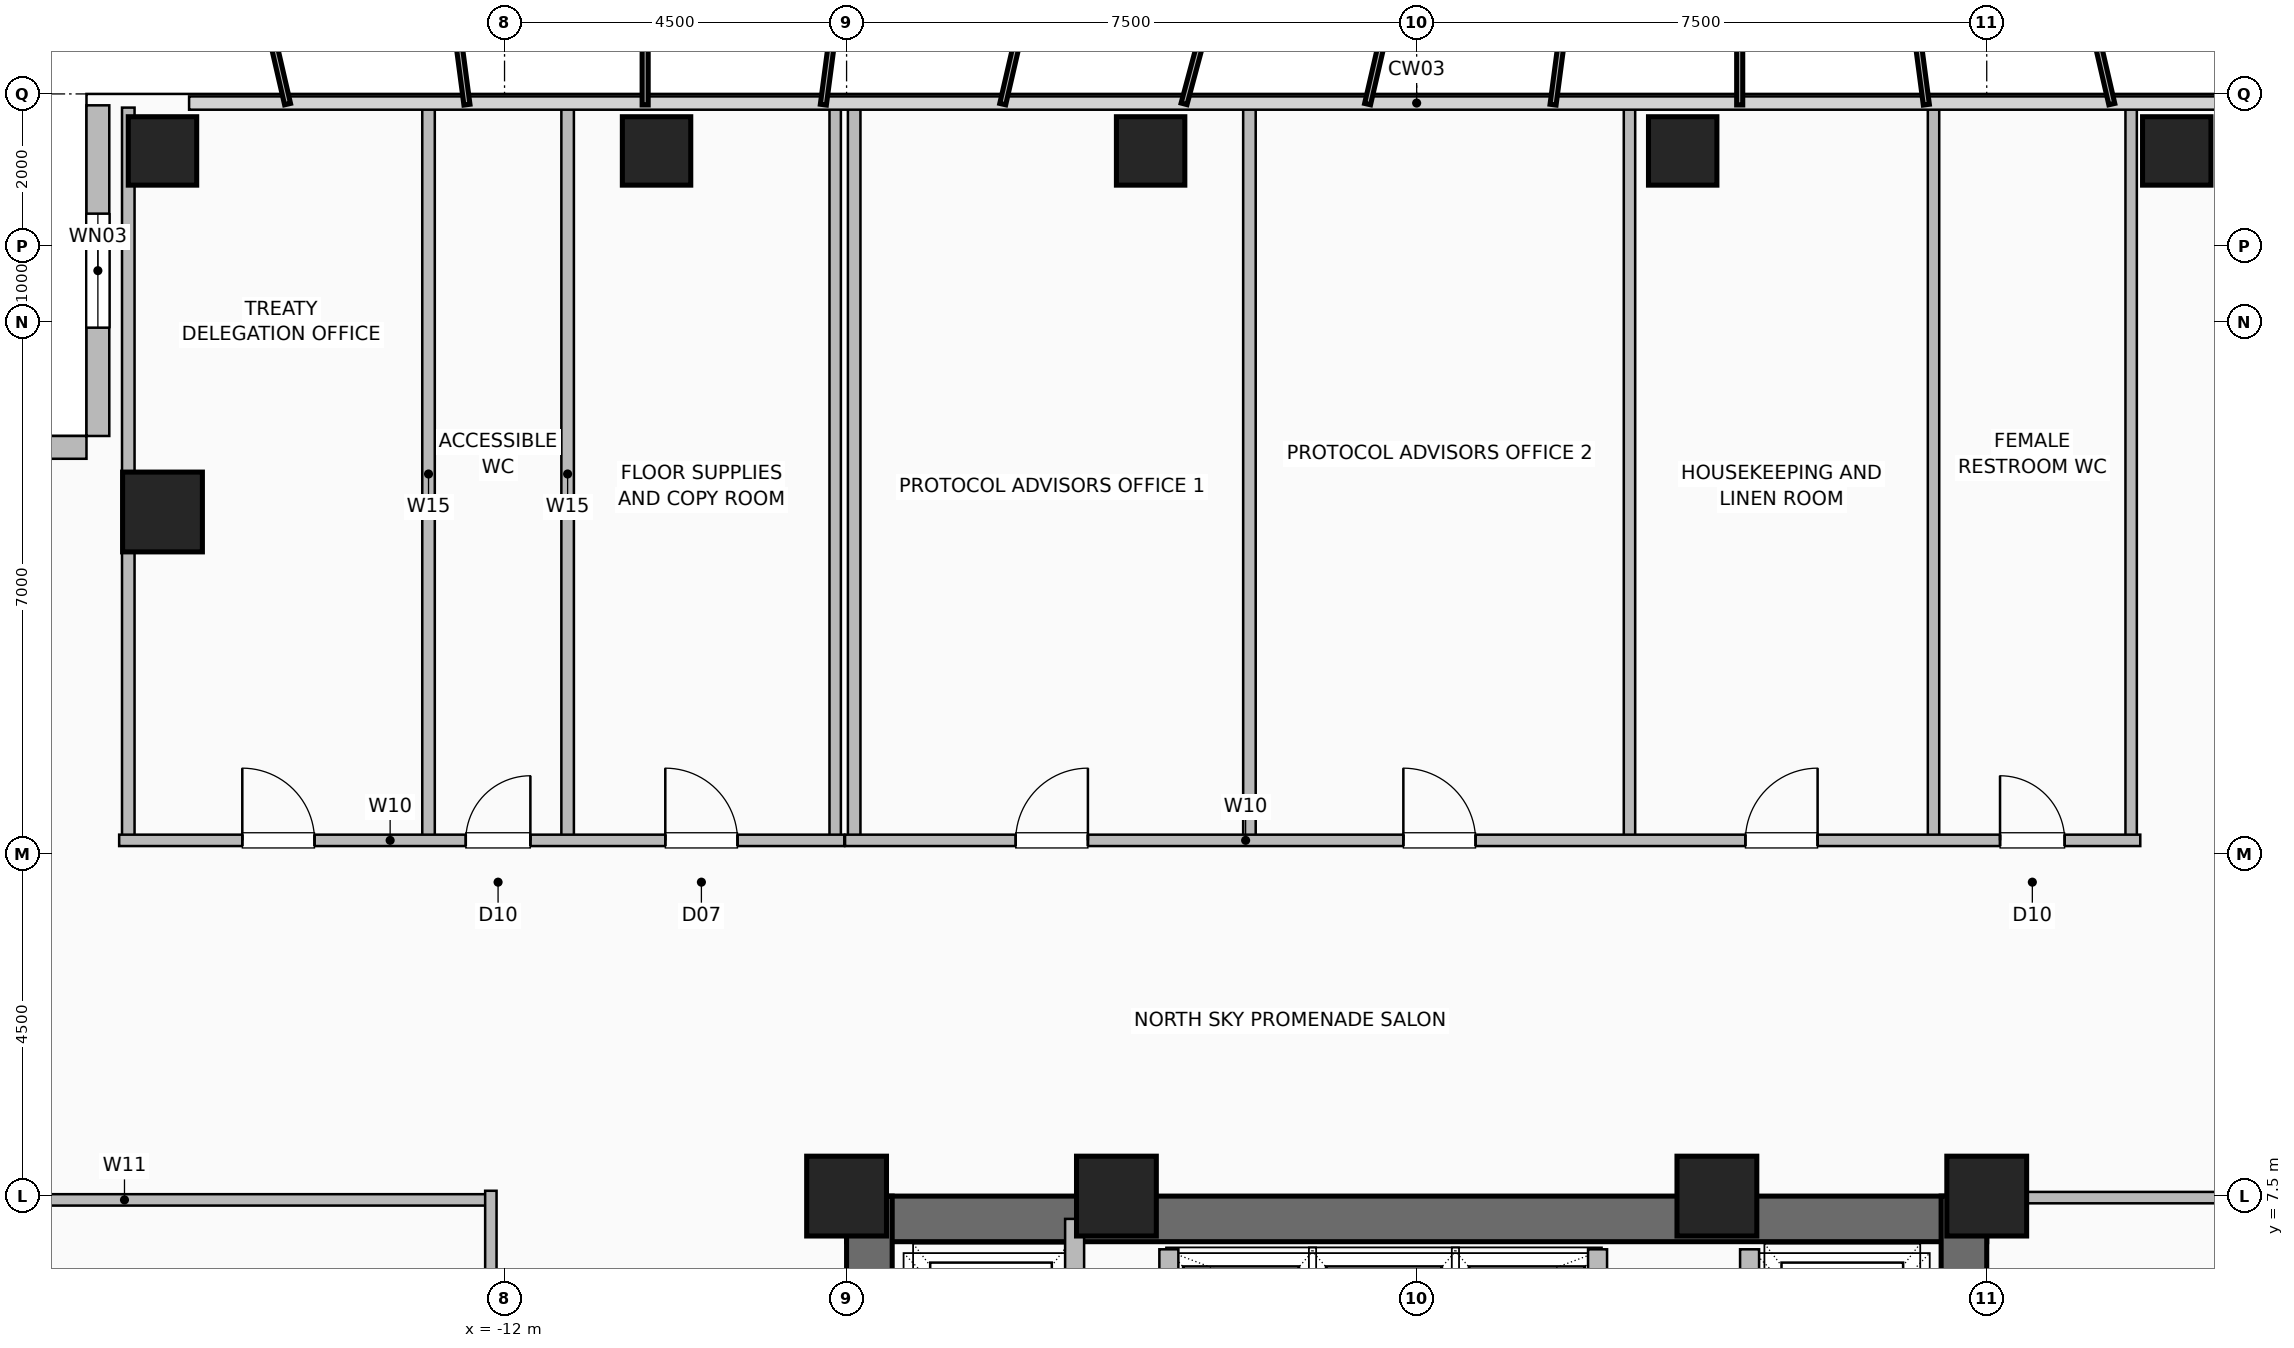
"""IFC4 building model, lengths in metres.
Left out: names, types, materials, properties, quantities, classifications, styles, units other than length and angle.
Written with IfcOpenShell. Run it as: python <this file> out.ifc"""

import sys

from ifc_helpers import new_model, si_unit, direction, frame, frame_2d, origin, origin_2d, place, context, subcontext, project, spatial, rectangle, hollow_rectangle, extrude, element, fill, save


model = new_model("IFC4")
c1 = context("Model", 3, precision=1e-05, world=origin(), true_north=direction((0.0, 1.0)))
c2 = subcontext(c1, "Body", "Model", "MODEL_VIEW")
j1 = project(units=[si_unit("LENGTHUNIT", "METRE"), si_unit("PLANEANGLEUNIT", "RADIAN")], contexts=[c1])
p1 = place(None, origin())
s1 = spatial("IfcSite", under=j1, at=p1, CompositionType="ELEMENT")
p2 = place(p1, origin())
s2 = spatial("IfcBuilding", under=s1, at=p2, CompositionType="ELEMENT")
p3 = place(p2, frame((0.0, 0.0, 148.0)))
s3 = spatial("IfcBuildingStorey", under=s2, at=p3, CompositionType="ELEMENT", Elevation=148.0)
for number, where, z_axis, x_axis in (
    (1, (7.5, 7.5, 0.0), (0.0, 0.0, 1.0), (1.0, 0.0, 0.0)),
    (2, (3.95, 7.5, 0.0), (0.0, 0.0, 1.0), (1.0, 0.0, 0.0)),
    (3, (-3.95, 7.5, 0.0), (0.0, 0.0, 1.0), (1.0, 0.0, 0.0)),
    (4, (-7.5, 7.5, 0.0), (0.0, 0.0, 1.0), (1.0, 0.0, 0.0)),
):
    element("IfcColumn", number, at=place(p3, frame(where, z_axis=z_axis, x_axis=x_axis)), inside=s3, PredefinedType="COLUMN", context=c2, shape_type="SweptSolid", body=[
        extrude(hollow_rectangle(XDim=1.05, YDim=1.05, WallThickness=0.05, at=origin_2d()), origin(), (0.0, 0.0, 1.0), 3.6),
    ])
for number, where, z_axis, x_axis in (
    (5, (-16.5, 21.25, 0.0), (0.0, 0.0, 1.0), (1.0, 0.0, 0.0)),
    (6, (-10.0, 21.25, 0.0), (0.0, 0.0, 1.0), (1.0, 0.0, 0.0)),
    (7, (-3.5, 21.25, 0.0), (0.0, 0.0, 1.0), (1.0, 0.0, 0.0)),
    (8, (3.5, 21.25, 0.0), (0.0, 0.0, 1.0), (1.0, 0.0, 0.0)),
    (9, (10.0, 21.25, 0.0), (0.0, 0.0, 1.0), (1.0, 0.0, 0.0)),
):
    element("IfcColumn", number, at=place(p3, frame(where, z_axis=z_axis, x_axis=x_axis)), inside=s3, PredefinedType="COLUMN", context=c2, shape_type="SweptSolid", body=[
        extrude(hollow_rectangle(XDim=0.9, YDim=0.9, WallThickness=0.045, at=origin_2d()), origin(), (0.0, 0.0, 1.0), 3.6),
    ])
p4 = place(p3, frame((-16.5, 16.5, 0.0), z_axis=(0.0, 0.0, 1.0), x_axis=(1.0, 0.0, 0.0)))
e10 = element("IfcColumn", 10, at=p4, inside=s3, PredefinedType="COLUMN", context=c2, shape_type="SweptSolid", body=[
    extrude(hollow_rectangle(XDim=1.05, YDim=1.05, WallThickness=0.05, at=origin_2d()), origin(), (0.0, 0.0, 1.0), 3.6),
])
p5 = place(p3, frame((-17.35, 21.85, 0.0), z_axis=(0.0, 0.0, 1.0), x_axis=(0.0, -1.0, 0.0)))
e11 = element("IfcWall", 11, at=p5, inside=s3, PredefinedType="SOLIDWALL", context=c2, shape_type="SweptSolid", body=[
    extrude(rectangle(XDim=4.35, YDim=0.3, at=frame_2d((2.175, 0.0))), origin(), (0.0, 0.0, 1.0), 3.36),
])
p6 = place(p5, frame((1.425, 0.0, 0.9)))
e12 = element("IfcOpeningElement", 12, at=p6, cuts=e11, PredefinedType="OPENING", context=c2, shape_type="SweptSolid", body=[
    extrude(rectangle(XDim=1.5, YDim=1.8, at=frame_2d((0.75, 0.9))), frame((0.0, 0.16, 0.0), z_axis=(0.0, -1.0, 0.0), x_axis=(1.0, 0.0, 0.0)), (0.0, 0.0, 1.0), 0.32),
])
p7 = place(p3, frame((-21.85, 17.35, 0.0), z_axis=(0.0, 0.0, 1.0), x_axis=(1.0, 0.0, 0.0)))
e13 = element("IfcWall", 13, at=p7, inside=s3, PredefinedType="SOLIDWALL", context=c2, shape_type="SweptSolid", body=[
    extrude(rectangle(XDim=4.35, YDim=0.3, at=frame_2d((2.175, 0.0))), origin(), (0.0, 0.0, 1.0), 3.36),
])
p8 = place(p3, frame((-7.5, 7.2, 0.0), z_axis=(0.0, 0.0, 1.0), x_axis=(1.0, 0.0, 0.0)))
e14 = element("IfcWall", 14, at=p8, inside=s3, PredefinedType="SHEAR", context=c2, shape_type="SweptSolid", body=[
    extrude(rectangle(XDim=15.0, YDim=0.6, at=frame_2d((7.5, 0.0))), origin(), (0.0, 0.0, 1.0), 3.36),
])
p9 = place(p3, frame((-7.2, -7.5, 0.0), z_axis=(0.0, 0.0, 1.0), x_axis=(0.0, 1.0, 0.0)))
e15 = element("IfcWall", 15, at=p9, inside=s3, PredefinedType="SHEAR", context=c2, shape_type="SweptSolid", body=[
    extrude(rectangle(XDim=15.0, YDim=0.6, at=frame_2d((7.5, 0.0))), origin(), (0.0, 0.0, 1.0), 3.36),
])
p10 = place(p9, frame((9.5, 0.0, 0.0)))
e16 = element("IfcOpeningElement", 16, at=p10, cuts=e15, PredefinedType="OPENING", context=c2, shape_type="SweptSolid", body=[
    extrude(rectangle(XDim=1.0, YDim=2.08, at=frame_2d((0.5, 1.04))), frame((0.0, 0.31, 0.0), z_axis=(0.0, -1.0, 0.0), x_axis=(1.0, 0.0, 0.0)), (0.0, 0.0, 1.0), 0.62),
])
p11 = place(p3, frame((7.2, -7.5, 0.0), z_axis=(0.0, 0.0, 1.0), x_axis=(0.0, 1.0, 0.0)))
e17 = element("IfcWall", 17, at=p11, inside=s3, PredefinedType="SHEAR", context=c2, shape_type="SweptSolid", body=[
    extrude(rectangle(XDim=15.0, YDim=0.6, at=frame_2d((7.5, 0.0))), origin(), (0.0, 0.0, 1.0), 3.36),
])
for number, where, z_axis, x_axis in (
    (18, (-3.26, 4.58, 0.0), (0.0, 0.0, 1.0), (0.0, 1.0, 0.0)),
    (19, (2.38, 4.58, 0.0), (0.0, 0.0, 1.0), (0.0, 1.0, 0.0)),
):
    element("IfcWall", number, at=place(p3, frame(where, z_axis=z_axis, x_axis=x_axis)), inside=s3, PredefinedType="SHEAR", context=c2, shape_type="SweptSolid", body=[
        extrude(rectangle(XDim=2.22, YDim=0.25, at=frame_2d((1.11, 0.0))), origin(), (0.0, 0.0, 1.0), 3.36),
    ])
p12 = place(p3, frame((-4.5, 4.35, 0.0), z_axis=(0.0, 0.0, 1.0), x_axis=(0.0, 1.0, 0.0)))
e20 = element("IfcWall", 20, at=p12, inside=s3, PredefinedType="SHEAR", context=c2, shape_type="SweptSolid", body=[
    extrude(rectangle(XDim=2.85, YDim=0.25, at=frame_2d((1.425, 0.0))), origin(), (0.0, 0.0, 1.0), 3.36),
])
p13 = place(p3, frame((4.38, 4.3, 0.0), z_axis=(0.0, 0.0, 1.0), x_axis=(0.0, 1.0, 0.0)))
e21 = element("IfcWall", 21, at=p13, inside=s3, PredefinedType="SHEAR", context=c2, shape_type="SweptSolid", body=[
    extrude(rectangle(XDim=2.5, YDim=0.25, at=frame_2d((1.25, 0.0))), origin(), (0.0, 0.0, 1.0), 3.36),
])
p14 = place(p13, frame((0.8, 0.0, 0.0)))
e22 = element("IfcOpeningElement", 22, at=p14, cuts=e21, PredefinedType="OPENING", context=c2, shape_type="SweptSolid", body=[
    extrude(rectangle(XDim=1.2, YDim=2.2, at=frame_2d((0.6, 1.1))), frame((0.0, 0.135, 0.0), z_axis=(0.0, -1.0, 0.0), x_axis=(1.0, 0.0, 0.0)), (0.0, 0.0, 1.0), 0.27),
])
p15 = place(p3, frame((-21.82, 7.45, 0.0), z_axis=(0.0, 0.0, 1.0), x_axis=(1.0, 0.0, 0.0)))
e23 = element("IfcWall", 23, at=p15, inside=s3, PredefinedType="PARTITIONING", context=c2, shape_type="SweptSolid", body=[
    extrude(rectangle(XDim=9.64, YDim=0.15, at=frame_2d((4.82, 0.0))), origin(), (0.0, 0.0, 1.0), 3.36),
])
p16 = place(p3, frame((-12.18, -7.57, 0.0), z_axis=(0.0, 0.0, 1.0), x_axis=(0.0, 1.0, 0.0)))
e24 = element("IfcWall", 24, at=p16, inside=s3, PredefinedType="PARTITIONING", context=c2, shape_type="SweptSolid", body=[
    extrude(rectangle(XDim=15.14, YDim=0.15, at=frame_2d((7.57, 0.0))), origin(), (0.0, 0.0, 1.0), 3.36),
])
p17 = place(p16, frame((4.17, 0.0, 0.0)))
e25 = element("IfcOpeningElement", 25, at=p17, cuts=e24, PredefinedType="OPENING", context=c2, shape_type="SweptSolid", body=[
    extrude(rectangle(XDim=0.95, YDim=2.06, at=frame_2d((0.475, 1.03))), frame((0.0, 0.085, 0.0), z_axis=(0.0, -1.0, 0.0), x_axis=(1.0, 0.0, 0.0)), (0.0, 0.0, 1.0), 0.17),
])
p18 = place(p16, frame((11.62, 0.0, 0.0)))
e26 = element("IfcOpeningElement", 26, at=p18, cuts=e24, PredefinedType="OPENING", context=c2, shape_type="SweptSolid", body=[
    extrude(rectangle(XDim=0.95, YDim=2.06, at=frame_2d((0.475, 1.03))), frame((0.0, 0.085, 0.0), z_axis=(0.0, -1.0, 0.0), x_axis=(1.0, 0.0, 0.0)), (0.0, 0.0, 1.0), 0.17),
])
for number, where, z_axis, x_axis in (
    (27, (-11.17, 12.18, 0.0), (0.0, 0.0, 1.0), (0.0, 1.0, 0.0)),
    (28, (-16.95, 12.18, 0.0), (0.0, 0.0, 1.0), (0.0, 1.0, 0.0)),
    (29, (-13.0, 12.18, 0.0), (0.0, 0.0, 1.0), (0.0, 1.0, 0.0)),
):
    element("IfcWall", number, at=place(p3, frame(where, z_axis=z_axis, x_axis=x_axis)), inside=s3, PredefinedType="PLUMBINGWALL", context=c2, shape_type="SweptSolid", body=[
        extrude(rectangle(XDim=9.64, YDim=0.165, at=frame_2d((4.82, 0.0))), origin(), (0.0, 0.0, 1.0), 3.36),
    ])
p19 = place(p3, frame((-7.65, 12.18, 0.0), z_axis=(0.0, 0.0, 1.0), x_axis=(0.0, 1.0, 0.0)))
e30 = element("IfcWall", 30, at=p19, inside=s3, PredefinedType="PARTITIONING", context=c2, shape_type="SweptSolid", body=[
    extrude(rectangle(XDim=9.64, YDim=0.15, at=frame_2d((4.82, 0.0))), origin(), (0.0, 0.0, 1.0), 3.36),
])
p20 = place(p3, frame((-17.07, 12.18, 0.0), z_axis=(0.0, 0.0, 1.0), x_axis=(1.0, 0.0, 0.0)))
e31 = element("IfcWall", 31, at=p20, inside=s3, PredefinedType="PARTITIONING", context=c2, shape_type="SweptSolid", body=[
    extrude(rectangle(XDim=9.54, YDim=0.15, at=frame_2d((4.77, 0.0))), origin(), (0.0, 0.0, 1.0), 3.36),
])
p21 = place(p20, frame((1.62, 0.0, 0.0)))
e32 = element("IfcOpeningElement", 32, at=p21, cuts=e31, PredefinedType="OPENING", context=c2, shape_type="SweptSolid", body=[
    extrude(rectangle(XDim=0.95, YDim=2.06, at=frame_2d((0.475, 1.03))), frame((0.0, 0.085, 0.0), z_axis=(0.0, -1.0, 0.0), x_axis=(1.0, 0.0, 0.0)), (0.0, 0.0, 1.0), 0.17),
])
p22 = place(p20, frame((4.56, 0.0, 0.0)))
e33 = element("IfcOpeningElement", 33, at=p22, cuts=e31, PredefinedType="OPENING", context=c2, shape_type="SweptSolid", body=[
    extrude(rectangle(XDim=0.85, YDim=2.05, at=frame_2d((0.425, 1.025))), frame((0.0, 0.085, 0.0), z_axis=(0.0, -1.0, 0.0), x_axis=(1.0, 0.0, 0.0)), (0.0, 0.0, 1.0), 0.17),
])
p23 = place(p20, frame((7.185, 0.0, 0.0)))
e34 = element("IfcOpeningElement", 34, at=p23, cuts=e31, PredefinedType="OPENING", context=c2, shape_type="SweptSolid", body=[
    extrude(rectangle(XDim=0.95, YDim=2.06, at=frame_2d((0.475, 1.03))), frame((0.0, 0.085, 0.0), z_axis=(0.0, -1.0, 0.0), x_axis=(1.0, 0.0, 0.0)), (0.0, 0.0, 1.0), 0.17),
])
for number, where, z_axis, x_axis in (
    (35, (-7.4, 12.18, 0.0), (0.0, 0.0, 1.0), (0.0, 1.0, 0.0)),
    (36, (-2.2, 12.18, 0.0), (0.0, 0.0, 1.0), (0.0, 1.0, 0.0)),
):
    element("IfcWall", number, at=place(p3, frame(where, z_axis=z_axis, x_axis=x_axis)), inside=s3, PredefinedType="PLUMBINGWALL", context=c2, shape_type="SweptSolid", body=[
        extrude(rectangle(XDim=9.64, YDim=0.165, at=frame_2d((4.82, 0.0))), origin(), (0.0, 0.0, 1.0), 3.36),
    ])
for number, where, z_axis, x_axis in (
    (37, (2.8, 12.18, 0.0), (0.0, 0.0, 1.0), (0.0, 1.0, 0.0)),
    (38, (6.8, 12.18, 0.0), (0.0, 0.0, 1.0), (0.0, 1.0, 0.0)),
    (39, (9.4, 12.18, 0.0), (0.0, 0.0, 1.0), (0.0, 1.0, 0.0)),
):
    element("IfcWall", number, at=place(p3, frame(where, z_axis=z_axis, x_axis=x_axis)), inside=s3, PredefinedType="PARTITIONING", context=c2, shape_type="SweptSolid", body=[
        extrude(rectangle(XDim=9.64, YDim=0.15, at=frame_2d((4.82, 0.0))), origin(), (0.0, 0.0, 1.0), 3.36),
    ])
p24 = place(p3, frame((-7.52, 12.18, 0.0), z_axis=(0.0, 0.0, 1.0), x_axis=(1.0, 0.0, 0.0)))
e40 = element("IfcWall", 40, at=p24, inside=s3, PredefinedType="PARTITIONING", context=c2, shape_type="SweptSolid", body=[
    extrude(rectangle(XDim=17.04, YDim=0.15, at=frame_2d((8.52, 0.0))), origin(), (0.0, 0.0, 1.0), 3.36),
])
p25 = place(p24, frame((2.245, 0.0, 0.0)))
e41 = element("IfcOpeningElement", 41, at=p25, cuts=e40, PredefinedType="OPENING", context=c2, shape_type="SweptSolid", body=[
    extrude(rectangle(XDim=0.95, YDim=2.06, at=frame_2d((0.475, 1.03))), frame((0.0, 0.085, 0.0), z_axis=(0.0, -1.0, 0.0), x_axis=(1.0, 0.0, 0.0)), (0.0, 0.0, 1.0), 0.17),
])
p26 = place(p24, frame((7.345, 0.0, 0.0)))
e42 = element("IfcOpeningElement", 42, at=p26, cuts=e40, PredefinedType="OPENING", context=c2, shape_type="SweptSolid", body=[
    extrude(rectangle(XDim=0.95, YDim=2.06, at=frame_2d((0.475, 1.03))), frame((0.0, 0.085, 0.0), z_axis=(0.0, -1.0, 0.0), x_axis=(1.0, 0.0, 0.0)), (0.0, 0.0, 1.0), 0.17),
])
p27 = place(p24, frame((11.845, 0.0, 0.0)))
e43 = element("IfcOpeningElement", 43, at=p27, cuts=e40, PredefinedType="OPENING", context=c2, shape_type="SweptSolid", body=[
    extrude(rectangle(XDim=0.95, YDim=2.06, at=frame_2d((0.475, 1.03))), frame((0.0, 0.085, 0.0), z_axis=(0.0, -1.0, 0.0), x_axis=(1.0, 0.0, 0.0)), (0.0, 0.0, 1.0), 0.17),
])
p28 = place(p24, frame((15.195, 0.0, 0.0)))
e44 = element("IfcOpeningElement", 44, at=p28, cuts=e40, PredefinedType="OPENING", context=c2, shape_type="SweptSolid", body=[
    extrude(rectangle(XDim=0.85, YDim=2.05, at=frame_2d((0.425, 1.025))), frame((0.0, 0.085, 0.0), z_axis=(0.0, -1.0, 0.0), x_axis=(1.0, 0.0, 0.0)), (0.0, 0.0, 1.0), 0.17),
])
p29 = place(p3, frame((7.6, 7.48, 0.0), z_axis=(0.0, 0.0, 1.0), x_axis=(1.0, 0.0, 0.0)))
e45 = element("IfcWall", 45, at=p29, inside=s3, PredefinedType="PARTITIONING", context=c2, shape_type="SweptSolid", body=[
    extrude(rectangle(XDim=14.22, YDim=0.15, at=frame_2d((7.11, 0.0))), origin(), (0.0, 0.0, 1.0), 3.36),
])
p30 = place(p6, origin())
e46 = element("IfcWindow", 46, at=p30, inside=s3, PartitioningType="SINGLE_PANEL", PredefinedType="WINDOW", context=c2, shape_type="SweptSolid", body=[
    extrude(rectangle(XDim=1.5, YDim=1.8, at=frame_2d((0.75, 0.9))), frame((0.0, 0.03, 0.0), z_axis=(0.0, -1.0, 0.0), x_axis=(1.0, 0.0, 0.0)), (0.0, 0.0, 1.0), 0.06),
])
fill(e12, e46)
p31 = place(p21, origin())
e47 = element("IfcDoor", 47, at=p31, inside=s3, OperationType="SINGLE_SWING_LEFT", PredefinedType="DOOR", context=c2, shape_type="SweptSolid", body=[
    extrude(rectangle(XDim=0.95, YDim=2.06, at=frame_2d((0.475, 1.03))), frame((0.0, 0.025, 0.0), z_axis=(0.0, -1.0, 0.0), x_axis=(1.0, 0.0, 0.0)), (0.0, 0.0, 1.0), 0.05),
])
fill(e32, e47)
p32 = place(p22, origin())
e48 = element("IfcDoor", 48, at=p32, inside=s3, OperationType="SINGLE_SWING_RIGHT", PredefinedType="DOOR", context=c2, shape_type="SweptSolid", body=[
    extrude(rectangle(XDim=0.85, YDim=2.05, at=frame_2d((0.425, 1.025))), frame((0.0, 0.025, 0.0), z_axis=(0.0, -1.0, 0.0), x_axis=(1.0, 0.0, 0.0)), (0.0, 0.0, 1.0), 0.05),
])
fill(e33, e48)
p33 = place(p23, origin())
e49 = element("IfcDoor", 49, at=p33, inside=s3, OperationType="SINGLE_SWING_LEFT", PredefinedType="DOOR", context=c2, shape_type="SweptSolid", body=[
    extrude(rectangle(XDim=0.95, YDim=2.06, at=frame_2d((0.475, 1.03))), frame((0.0, 0.025, 0.0), z_axis=(0.0, -1.0, 0.0), x_axis=(1.0, 0.0, 0.0)), (0.0, 0.0, 1.0), 0.05),
])
fill(e34, e49)
p34 = place(p25, origin())
e50 = element("IfcDoor", 50, at=p34, inside=s3, OperationType="SINGLE_SWING_RIGHT", PredefinedType="DOOR", context=c2, shape_type="SweptSolid", body=[
    extrude(rectangle(XDim=0.95, YDim=2.06, at=frame_2d((0.475, 1.03))), frame((0.0, 0.025, 0.0), z_axis=(0.0, -1.0, 0.0), x_axis=(1.0, 0.0, 0.0)), (0.0, 0.0, 1.0), 0.05),
])
fill(e41, e50)
p35 = place(p26, origin())
e51 = element("IfcDoor", 51, at=p35, inside=s3, OperationType="SINGLE_SWING_LEFT", PredefinedType="DOOR", context=c2, shape_type="SweptSolid", body=[
    extrude(rectangle(XDim=0.95, YDim=2.06, at=frame_2d((0.475, 1.03))), frame((0.0, 0.025, 0.0), z_axis=(0.0, -1.0, 0.0), x_axis=(1.0, 0.0, 0.0)), (0.0, 0.0, 1.0), 0.05),
])
fill(e42, e51)
p36 = place(p27, origin())
e52 = element("IfcDoor", 52, at=p36, inside=s3, OperationType="SINGLE_SWING_RIGHT", PredefinedType="DOOR", context=c2, shape_type="SweptSolid", body=[
    extrude(rectangle(XDim=0.95, YDim=2.06, at=frame_2d((0.475, 1.03))), frame((0.0, 0.025, 0.0), z_axis=(0.0, -1.0, 0.0), x_axis=(1.0, 0.0, 0.0)), (0.0, 0.0, 1.0), 0.05),
])
fill(e43, e52)
p37 = place(p28, origin())
e53 = element("IfcDoor", 53, at=p37, inside=s3, OperationType="SINGLE_SWING_LEFT", PredefinedType="DOOR", context=c2, shape_type="SweptSolid", body=[
    extrude(rectangle(XDim=0.85, YDim=2.05, at=frame_2d((0.425, 1.025))), frame((0.0, 0.025, 0.0), z_axis=(0.0, -1.0, 0.0), x_axis=(1.0, 0.0, 0.0)), (0.0, 0.0, 1.0), 0.05),
])
fill(e44, e53)
save(model, sys.argv[1])
